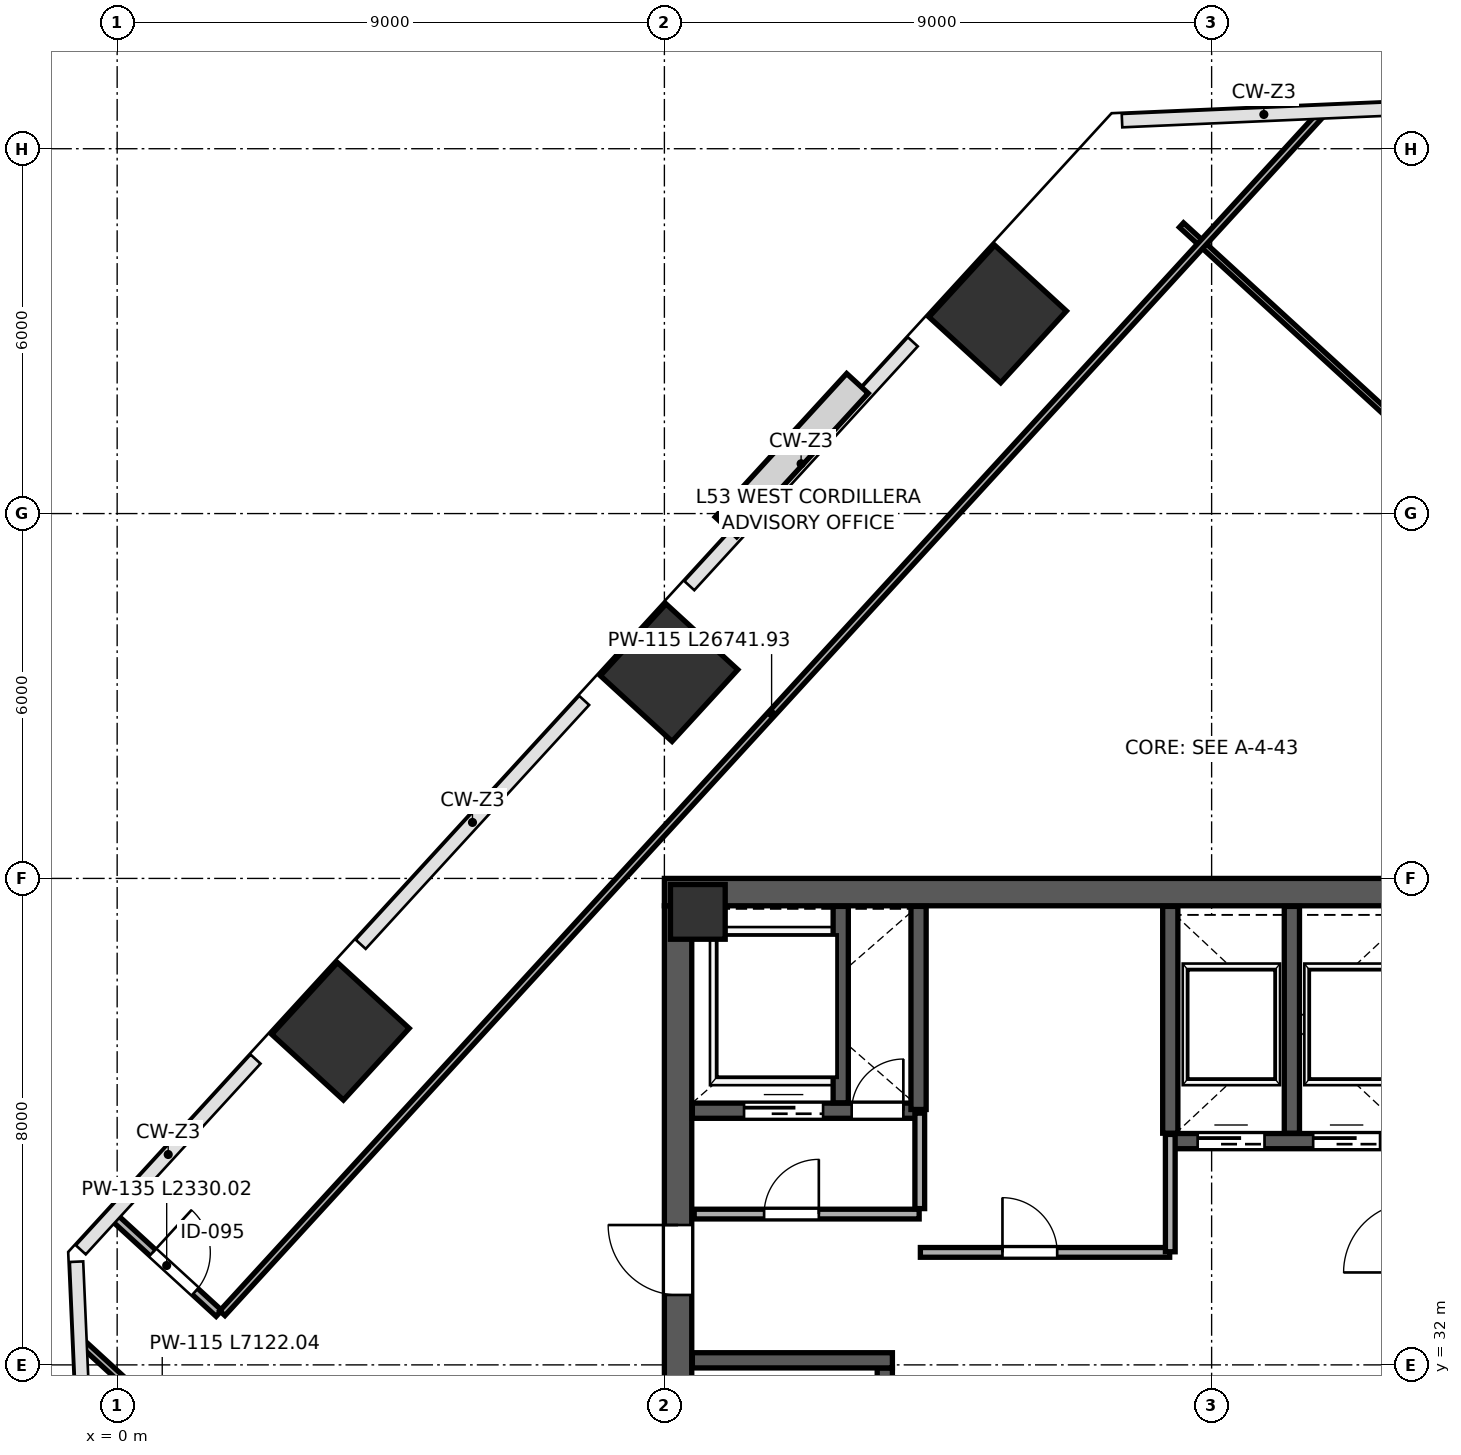
"""IFC4 building model, lengths in metres.
Left out: names, types, materials, properties, quantities, classifications, styles, units other than length and angle.
Written with IfcOpenShell. Run it as: python <this file> out.ifc"""

import sys

from ifc_helpers import new_model, si_unit, direction, frame, frame_2d, origin, origin_2d, place, context, subcontext, project, spatial, rectangle, extrude, source, transform, mapped, element, fill, save


model = new_model("IFC4")
c1 = context("Model", 3, precision=1e-05, world=origin(), true_north=direction((0.0, 1.0)))
c2 = subcontext(c1, "Body", "Model", "MODEL_VIEW")
j1 = project(units=[si_unit("LENGTHUNIT", "METRE"), si_unit("PLANEANGLEUNIT", "RADIAN")], contexts=[c1])
p1 = place(None, origin())
s1 = spatial("IfcSite", under=j1, at=p1, CompositionType="ELEMENT")
p2 = place(p1, origin())
s2 = spatial("IfcBuilding", under=s1, at=p2, CompositionType="ELEMENT")
p3 = place(p2, frame((0.0, 0.0, 237.4)))
s3 = spatial("IfcBuildingStorey", under=s2, at=p3, CompositionType="ELEMENT", Elevation=237.4)
m1 = source(origin(), c2, "Body", "SweptSolid", [
    extrude(rectangle(XDim=0.9, YDim=0.9, at=origin_2d()), origin(), (0.0, 0.0, 1.0), 4.199),
])
p4 = place(p3, frame((9.55, 39.45, 0.001), z_axis=(0.0, 0.0, 1.0), x_axis=(1.0, 0.0, 0.0)))
e1 = element("IfcColumn", 1, at=p4, inside=s3, PredefinedType="COLUMN", context=c2, shape_type="MappedRepresentation", body=[
    mapped(m1, transform((0.0, 0.0, 0.0), scale=1.0)),
])
m2 = source(origin(), c2, "Body", "SweptSolid", [
    extrude(rectangle(XDim=1.6, YDim=1.6, at=origin_2d()), origin(), (0.0, 0.0, 1.0), 4.199),
])
for number, where, z_axis, x_axis in (
    (2, (3.672, 37.486, 0.001), (0.0, 0.0, 1.0), (-0.737, 0.676, 0.0)),
    (3, (9.077, 43.384, 0.001), (0.0, 0.0, 1.0), (-0.737, 0.676, 0.0)),
    (4, (14.482, 49.282, 0.001), (0.0, 0.0, 1.0), (-0.737, 0.676, 0.0)),
):
    element("IfcColumn", number, at=place(p3, frame(where, z_axis=z_axis, x_axis=x_axis)), inside=s3, PredefinedType="COLUMN", context=c2, shape_type="MappedRepresentation", body=[
        mapped(m2, transform((0.0, 0.0, 0.0), scale=1.0)),
    ])
p5 = place(p3, frame((9.225, 24.45, 0.0), z_axis=(0.0, 0.0, 1.0), x_axis=(0.0, 1.0, 0.0)))
e5 = element("IfcWall", 5, at=p5, inside=s3, PredefinedType="SHEAR", context=c2, shape_type="SweptSolid", body=[
    extrude(rectangle(XDim=15.1, YDim=0.45, at=frame_2d((7.55, 0.0))), origin(), (0.0, 0.0, 1.0), 3.96),
])
p6 = place(p5, frame((8.7, 0.0, 0.0)))
e6 = element("IfcOpeningElement", 6, at=p6, cuts=e5, PredefinedType="OPENING", context=c2, shape_type="SweptSolid", body=[
    extrude(rectangle(XDim=1.15, YDim=2.2, at=frame_2d((0.575, 1.1))), frame((0.0, 0.235, 0.0), z_axis=(0.0, -1.0, 0.0), x_axis=(1.0, 0.0, 0.0)), (0.0, 0.0, 1.0), 0.47),
])
p7 = place(p3, frame((9.0, 39.775, 0.0), z_axis=(0.0, 0.0, 1.0), x_axis=(1.0, 0.0, 0.0)))
e7 = element("IfcWall", 7, at=p7, inside=s3, PredefinedType="SHEAR", context=c2, shape_type="SweptSolid", body=[
    extrude(rectangle(XDim=18.0, YDim=0.45, at=frame_2d((9.0, 0.0))), origin(), (0.0, 0.0, 1.0), 3.96),
])
p8 = place(p3, frame((12.625, 24.46, 0.0), z_axis=(0.0, 0.0, 1.0), x_axis=(0.0, 1.0, 0.0)))
e8 = element("IfcWall", 8, at=p8, inside=s3, PredefinedType="SHEAR", context=c2, shape_type="SweptSolid", body=[
    extrude(rectangle(XDim=7.49, YDim=0.25, at=frame_2d((3.745, 0.0))), origin(), (0.0, 0.0, 1.0), 3.96),
])
p9 = place(p8, frame((5.85, 0.0, 0.0)))
e9 = element("IfcOpeningElement", 9, at=p9, cuts=e8, PredefinedType="OPENING", context=c2, shape_type="SweptSolid", body=[
    extrude(rectangle(XDim=1.15, YDim=2.2, at=frame_2d((0.575, 1.1))), frame((0.0, 0.135, 0.0), z_axis=(0.0, -1.0, 0.0), x_axis=(1.0, 0.0, 0.0)), (0.0, 0.0, 1.0), 0.27),
])
p10 = place(p3, frame((9.46, 32.075, 0.0), z_axis=(0.0, 0.0, 1.0), x_axis=(1.0, 0.0, 0.0)))
e10 = element("IfcWall", 10, at=p10, inside=s3, PredefinedType="SHEAR", context=c2, shape_type="SweptSolid", body=[
    extrude(rectangle(XDim=3.29, YDim=0.25, at=frame_2d((1.645, 0.0))), origin(), (0.0, 0.0, 1.0), 3.96),
])
p11 = place(p3, frame((9.46, 36.18, 0.0), z_axis=(0.0, 0.0, 1.0), x_axis=(1.0, 0.0, 0.0)))
e11 = element("IfcWall", 11, at=p11, inside=s3, PredefinedType="SHEAR", context=c2, shape_type="SweptSolid", body=[
    extrude(rectangle(XDim=3.79, YDim=0.25, at=frame_2d((1.895, 0.0))), origin(), (0.0, 0.0, 1.0), 3.96),
])
p12 = place(p11, frame((2.62, 0.0, 0.0)))
e12 = element("IfcOpeningElement", 12, at=p12, cuts=e11, PredefinedType="OPENING", context=c2, shape_type="SweptSolid", body=[
    extrude(rectangle(XDim=0.85, YDim=2.1, at=frame_2d((0.425, 1.05))), frame((0.0, 0.135, 0.0), z_axis=(0.0, -1.0, 0.0), x_axis=(1.0, 0.0, 0.0)), (0.0, 0.0, 1.0), 0.27),
])
p13 = place(p11, frame((0.85, 0.0, 0.0)))
e13 = element("IfcOpeningElement", 13, at=p13, cuts=e11, PredefinedType="OPENING", context=c2, shape_type="SweptSolid", body=[
    extrude(rectangle(XDim=1.3, YDim=2.25, at=frame_2d((0.65, 1.125))), frame((0.0, 0.135, 0.0), z_axis=(0.0, -1.0, 0.0), x_axis=(1.0, 0.0, 0.0)), (0.0, 0.0, 1.0), 0.27),
])
p14 = place(p3, frame((11.9, 36.31, 0.0), z_axis=(0.0, 0.0, 1.0), x_axis=(0.0, 1.0, 0.0)))
e14 = element("IfcWall", 14, at=p14, inside=s3, PredefinedType="SHEAR", context=c2, shape_type="SweptSolid", body=[
    extrude(rectangle(XDim=3.23, YDim=0.25, at=frame_2d((1.615, 0.0))), origin(), (0.0, 0.0, 1.0), 3.96),
])
p15 = place(p3, frame((13.18, 36.2, 0.0), z_axis=(0.0, 0.0, 1.0), x_axis=(0.0, 1.0, 0.0)))
e15 = element("IfcWall", 15, at=p15, inside=s3, PredefinedType="SHEAR", context=c2, shape_type="SweptSolid", body=[
    extrude(rectangle(XDim=3.34, YDim=0.25, at=frame_2d((1.67, 0.0))), origin(), (0.0, 0.0, 1.0), 3.96),
])
p16 = place(p3, frame((17.32, 35.68, 0.0), z_axis=(0.0, 0.0, 1.0), x_axis=(1.0, 0.0, 0.0)))
e16 = element("IfcWall", 16, at=p16, inside=s3, PredefinedType="SHEAR", context=c2, shape_type="SweptSolid", body=[
    extrude(rectangle(XDim=3.87, YDim=0.25, at=frame_2d((1.935, 0.0))), origin(), (0.0, 0.0, 1.0), 3.96),
])
p17 = place(p16, frame((0.45, 0.0, 0.0)))
e17 = element("IfcOpeningElement", 17, at=p17, cuts=e16, PredefinedType="OPENING", context=c2, shape_type="SweptSolid", body=[
    extrude(rectangle(XDim=1.1, YDim=2.2, at=frame_2d((0.55, 1.1))), frame((0.0, 0.135, 0.0), z_axis=(0.0, -1.0, 0.0), x_axis=(1.0, 0.0, 0.0)), (0.0, 0.0, 1.0), 0.27),
])
p18 = place(p16, frame((2.35, 0.0, 0.0)))
e18 = element("IfcOpeningElement", 18, at=p18, cuts=e16, PredefinedType="OPENING", context=c2, shape_type="SweptSolid", body=[
    extrude(rectangle(XDim=1.1, YDim=2.2, at=frame_2d((0.55, 1.1))), frame((0.0, 0.135, 0.0), z_axis=(0.0, -1.0, 0.0), x_axis=(1.0, 0.0, 0.0)), (0.0, 0.0, 1.0), 0.27),
])
for number, where, z_axis, x_axis in (
    (19, (17.32, 35.81, 0.0), (0.0, 0.0, 1.0), (0.0, 1.0, 0.0)),
    (20, (19.32, 35.81, 0.0), (0.0, 0.0, 1.0), (0.0, 1.0, 0.0)),
):
    element("IfcWall", number, at=place(p3, frame(where, z_axis=z_axis, x_axis=x_axis)), inside=s3, PredefinedType="SHEAR", context=c2, shape_type="SweptSolid", body=[
        extrude(rectangle(XDim=3.73, YDim=0.25, at=frame_2d((1.865, 0.0))), origin(), (0.0, 0.0, 1.0), 3.96),
    ])
p19 = place(p3, frame((9.49, 34.48, 0.0), z_axis=(0.0, 0.0, 1.0), x_axis=(1.0, 0.0, 0.0)))
e21 = element("IfcWall", 21, at=p19, inside=s3, PredefinedType="PARTITIONING", context=c2, shape_type="SweptSolid", body=[
    extrude(rectangle(XDim=3.7, YDim=0.16, at=frame_2d((1.85, 0.0))), origin(), (0.0, 0.0, 1.0), 3.96),
])
p20 = place(p19, frame((1.15, 0.0, 0.0)))
e22 = element("IfcOpeningElement", 22, at=p20, cuts=e21, PredefinedType="OPENING", context=c2, shape_type="SweptSolid", body=[
    extrude(rectangle(XDim=0.9, YDim=2.15, at=frame_2d((0.45, 1.075))), frame((0.0, 0.09, 0.0), z_axis=(0.0, -1.0, 0.0), x_axis=(1.0, 0.0, 0.0)), (0.0, 0.0, 1.0), 0.18),
])
p21 = place(p3, frame((13.2, 34.57, 0.0), z_axis=(0.0, 0.0, 1.0), x_axis=(0.0, 1.0, 0.0)))
e23 = element("IfcWall", 23, at=p21, inside=s3, PredefinedType="PARTITIONING", context=c2, shape_type="SweptSolid", body=[
    extrude(rectangle(XDim=1.57, YDim=0.16, at=frame_2d((0.785, 0.0))), origin(), (0.0, 0.0, 1.0), 3.96),
])
p22 = place(p3, frame((13.21, 33.85, 0.0), z_axis=(0.0, 0.0, 1.0), x_axis=(1.0, 0.0, 0.0)))
e24 = element("IfcWall", 24, at=p22, inside=s3, PredefinedType="PARTITIONING", context=c2, shape_type="SweptSolid", body=[
    extrude(rectangle(XDim=4.1, YDim=0.16, at=frame_2d((2.05, 0.0))), origin(), (0.0, 0.0, 1.0), 3.96),
])
p23 = place(p22, frame((1.35, 0.0, 0.0)))
e25 = element("IfcOpeningElement", 25, at=p23, cuts=e24, PredefinedType="OPENING", context=c2, shape_type="SweptSolid", body=[
    extrude(rectangle(XDim=0.9, YDim=2.15, at=frame_2d((0.45, 1.075))), frame((0.0, 0.09, 0.0), z_axis=(0.0, -1.0, 0.0), x_axis=(1.0, 0.0, 0.0)), (0.0, 0.0, 1.0), 0.18),
])
p24 = place(p3, frame((17.32, 33.86, 0.0), z_axis=(0.0, 0.0, 1.0), x_axis=(0.0, 1.0, 0.0)))
e26 = element("IfcWall", 26, at=p24, inside=s3, PredefinedType="PARTITIONING", context=c2, shape_type="SweptSolid", body=[
    extrude(rectangle(XDim=1.93, YDim=0.16, at=frame_2d((0.965, 0.0))), origin(), (0.0, 0.0, 1.0), 3.96),
])
p25 = place(p3, frame((-0.571, 32.354, 0.0), z_axis=(0.0, 0.0, 1.0), x_axis=(0.737285035525, -0.675581805846, 0.0)))
e27 = element("IfcWall", 27, at=p25, inside=s3, PredefinedType="PARTITIONING", context=c2, shape_type="SweptSolid", body=[
    extrude(rectangle(XDim=7.122, YDim=0.115, at=frame_2d((3.561, 0.0))), origin(), (0.0, 0.0, 1.0), 3.96),
])
p26 = place(p25, frame((2.6, 0.0, 0.0)))
e28 = element("IfcOpeningElement", 28, at=p26, cuts=e27, PredefinedType="OPENING", context=c2, shape_type="SweptSolid", body=[
    extrude(rectangle(XDim=0.9, YDim=2.15, at=frame_2d((0.45, 1.075))), frame((0.0, 0.067, 0.0), z_axis=(0.0, -1.0, 0.0), x_axis=(1.0, 0.0, 0.0)), (0.0, 0.0, 1.0), 0.135),
])
p27 = place(p25, frame((4.7, 0.0, 0.0)))
e29 = element("IfcOpeningElement", 29, at=p27, cuts=e27, PredefinedType="OPENING", context=c2, shape_type="SweptSolid", body=[
    extrude(rectangle(XDim=0.95, YDim=2.15, at=frame_2d((0.475, 1.075))), frame((0.0, 0.067, 0.0), z_axis=(0.0, -1.0, 0.0), x_axis=(1.0, 0.0, 0.0)), (0.0, 0.0, 1.0), 0.135),
])
p28 = place(p3, frame((17.504, 50.744, 0.0), z_axis=(0.0, 0.0, 1.0), x_axis=(0.737277850523, -0.675589646996, 0.0)))
e30 = element("IfcWall", 30, at=p28, inside=s3, PredefinedType="PARTITIONING", context=c2, shape_type="SweptSolid", body=[
    extrude(rectangle(XDim=21.87, YDim=0.1, at=frame_2d((10.935, 0.0))), origin(), (0.0, 0.0, 1.0), 3.96),
])
p29 = place(p28, frame((5.4, 0.0, 0.0)))
e31 = element("IfcOpeningElement", 31, at=p29, cuts=e30, PredefinedType="OPENING", context=c2, shape_type="SweptSolid", body=[
    extrude(rectangle(XDim=0.95, YDim=2.15, at=frame_2d((0.475, 1.075))), frame((0.0, 0.06, 0.0), z_axis=(0.0, -1.0, 0.0), x_axis=(1.0, 0.0, 0.0)), (0.0, 0.0, 1.0), 0.12),
])
p30 = place(p3, frame((-0.044, 34.421, 0.0), z_axis=(0.0, 0.0, 1.0), x_axis=(0.73728894688, -0.675577537229, 0.0)))
e32 = element("IfcWall", 32, at=p30, inside=s3, PredefinedType="PARTITIONING", context=c2, shape_type="SweptSolid", body=[
    extrude(rectangle(XDim=2.33, YDim=0.135, at=frame_2d((1.165, 0.0))), origin(), (0.0, 0.0, 1.0), 3.96),
])
p31 = place(p30, frame((0.85, 0.0, 0.0)))
e33 = element("IfcOpeningElement", 33, at=p31, cuts=e32, PredefinedType="OPENING", context=c2, shape_type="SweptSolid", body=[
    extrude(rectangle(XDim=0.95, YDim=2.15, at=frame_2d((0.475, 1.075))), frame((0.0, 0.078, 0.0), z_axis=(0.0, -1.0, 0.0), x_axis=(1.0, 0.0, 0.0)), (0.0, 0.0, 1.0), 0.155),
])
p32 = place(p3, frame((1.73, 32.85, 0.0), z_axis=(0.0, 0.0, 1.0), x_axis=(0.675589845589, 0.737277668546, 0.0)))
e34 = element("IfcWall", 34, at=p32, inside=s3, PredefinedType="PARTITIONING", context=c2, shape_type="SweptSolid", body=[
    extrude(rectangle(XDim=26.742, YDim=0.115, at=frame_2d((13.371, 0.0))), origin(), (0.0, 0.0, 1.0), 3.96),
])
m3 = source(origin(), c2, "Body", "SweptSolid", [
    extrude(rectangle(XDim=1.15, YDim=2.2, at=frame_2d((0.575, 1.1))), frame((0.0, 0.025, 0.0), z_axis=(0.0, -1.0, 0.0), x_axis=(1.0, 0.0, 0.0)), (0.0, 0.0, 1.0), 0.05),
])
p33 = place(p6, origin())
e35 = element("IfcDoor", 35, at=p33, inside=s3, OperationType="SINGLE_SWING_RIGHT", PredefinedType="DOOR", context=c2, shape_type="MappedRepresentation", body=[
    mapped(m3, transform((0.0, 0.0, 0.0), scale=1.0)),
])
fill(e6, e35)
m4 = source(origin(), c2, "Body", "SweptSolid", [
    extrude(rectangle(XDim=0.85, YDim=2.1, at=frame_2d((0.425, 1.05))), frame((0.0, 0.025, 0.0), z_axis=(0.0, -1.0, 0.0), x_axis=(1.0, 0.0, 0.0)), (0.0, 0.0, 1.0), 0.05),
])
p34 = place(p12, origin())
e36 = element("IfcDoor", 36, at=p34, inside=s3, OperationType="SINGLE_SWING_RIGHT", PredefinedType="DOOR", context=c2, shape_type="MappedRepresentation", body=[
    mapped(m4, transform((0.0, 0.0, 0.0), scale=1.0)),
])
fill(e12, e36)
m5 = source(origin(), c2, "Body", "SweptSolid", [
    extrude(rectangle(XDim=1.1, YDim=2.2, at=frame_2d((0.55, 1.1))), frame((0.0, 0.025, 0.0), z_axis=(0.0, -1.0, 0.0), x_axis=(1.0, 0.0, 0.0)), (0.0, 0.0, 1.0), 0.05),
])
p35 = place(p17, origin())
e37 = element("IfcDoor", 37, at=p35, inside=s3, OperationType="SLIDING_TO_LEFT", PredefinedType="DOOR", context=c2, shape_type="MappedRepresentation", body=[
    mapped(m5, transform((0.0, 0.0, 0.0), scale=1.0)),
])
fill(e17, e37)
p36 = place(p18, origin())
e38 = element("IfcDoor", 38, at=p36, inside=s3, OperationType="SLIDING_TO_RIGHT", PredefinedType="DOOR", context=c2, shape_type="MappedRepresentation", body=[
    mapped(m5, transform((0.0, 0.0, 0.0), scale=1.0)),
])
fill(e18, e38)
m6 = source(origin(), c2, "Body", "SweptSolid", [
    extrude(rectangle(XDim=1.3, YDim=2.25, at=frame_2d((0.65, 1.125))), frame((0.0, 0.025, 0.0), z_axis=(0.0, -1.0, 0.0), x_axis=(1.0, 0.0, 0.0)), (0.0, 0.0, 1.0), 0.05),
])
p37 = place(p13, origin())
e39 = element("IfcDoor", 39, at=p37, inside=s3, OperationType="SLIDING_TO_LEFT", PredefinedType="DOOR", context=c2, shape_type="MappedRepresentation", body=[
    mapped(m6, transform((0.0, 0.0, 0.0), scale=1.0)),
])
fill(e13, e39)
m7 = source(origin(), c2, "Body", "SweptSolid", [
    extrude(rectangle(XDim=0.9, YDim=2.15, at=frame_2d((0.45, 1.075))), frame((0.0, 0.025, 0.0), z_axis=(0.0, -1.0, 0.0), x_axis=(1.0, 0.0, 0.0)), (0.0, 0.0, 1.0), 0.05),
])
p38 = place(p20, origin())
e40 = element("IfcDoor", 40, at=p38, inside=s3, OperationType="SINGLE_SWING_RIGHT", PredefinedType="DOOR", context=c2, shape_type="MappedRepresentation", body=[
    mapped(m7, transform((0.0, 0.0, 0.0), scale=1.0)),
])
fill(e22, e40)
p39 = place(p23, origin())
e41 = element("IfcDoor", 41, at=p39, inside=s3, OperationType="SINGLE_SWING_LEFT", PredefinedType="DOOR", context=c2, shape_type="MappedRepresentation", body=[
    mapped(m7, transform((0.0, 0.0, 0.0), scale=1.0)),
])
fill(e25, e41)
m8 = source(origin(), c2, "Body", "SweptSolid", [
    extrude(rectangle(XDim=0.95, YDim=2.15, at=frame_2d((0.475, 1.075))), frame((0.0, 0.025, 0.0), z_axis=(0.0, -1.0, 0.0), x_axis=(1.0, 0.0, 0.0)), (0.0, 0.0, 1.0), 0.05),
])
p40 = place(p31, origin())
e42 = element("IfcDoor", 42, at=p40, inside=s3, OperationType="SINGLE_SWING_LEFT", PredefinedType="DOOR", context=c2, shape_type="MappedRepresentation", body=[
    mapped(m8, transform((0.0, 0.0, 0.0), scale=1.0)),
])
fill(e33, e42)
save(model, sys.argv[1])
